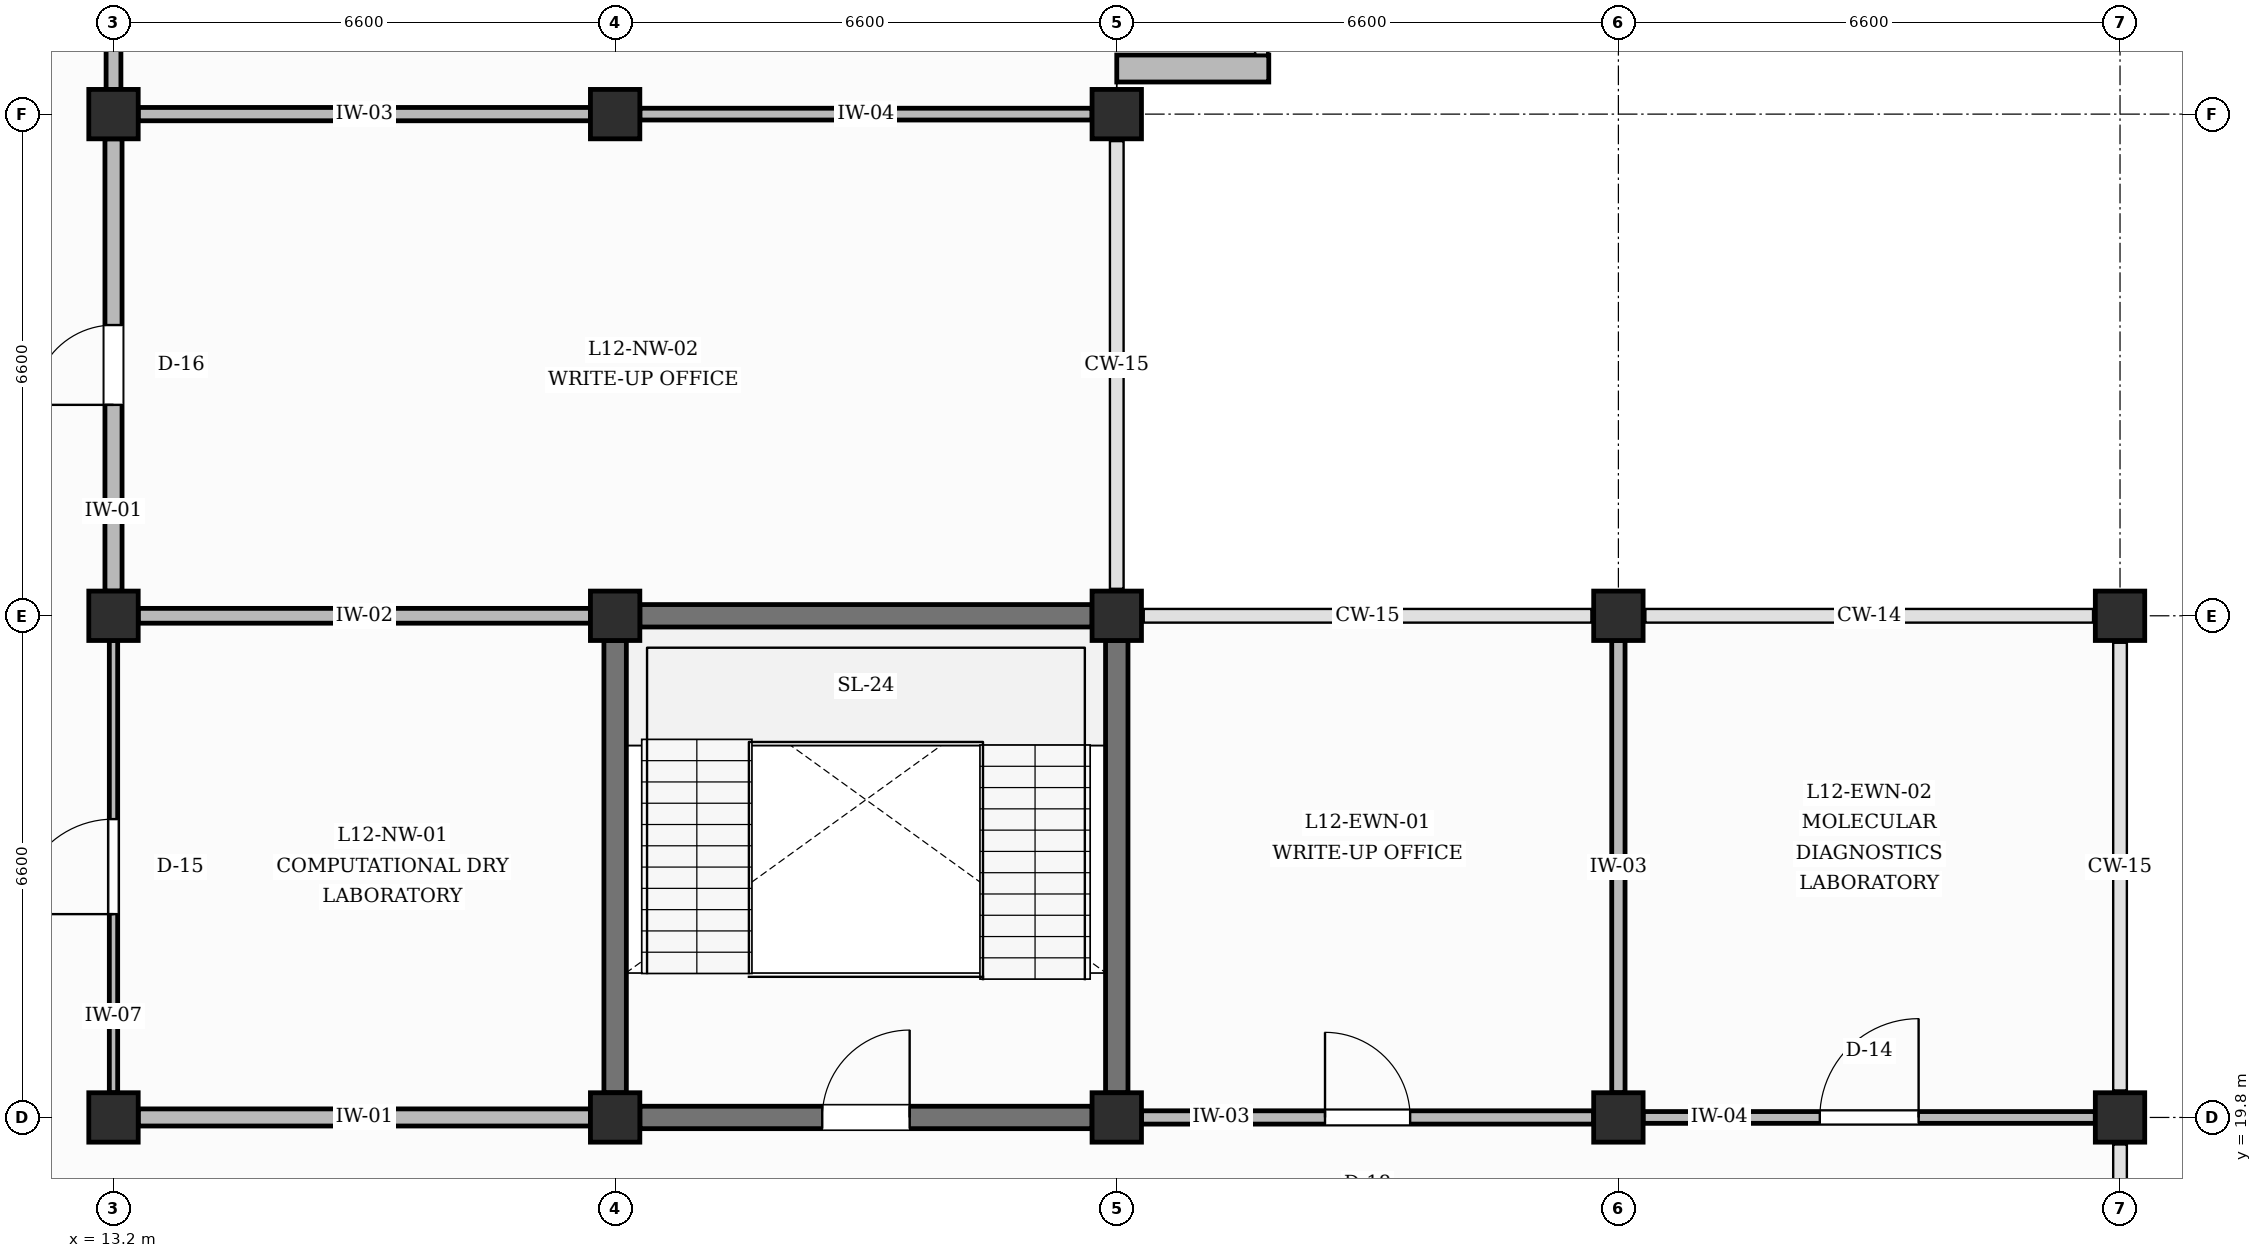
"""IFC4 building model, lengths in metres.
Left out: names, types, materials, properties, quantities, classifications, styles, units other than length and angle.
Written with IfcOpenShell. Run it as: python <this file> out.ifc"""

import sys

from ifc_helpers import new_model, si_unit, direction, frame, frame_2d, origin, origin_2d, place, context, subcontext, project, spatial, rectangle, extrude, element, fill, save


model = new_model("IFC4")
c1 = context("Model", 3, precision=1e-05, world=origin(), true_north=direction((0.0, 1.0)))
c2 = subcontext(c1, "Body", "Model", "MODEL_VIEW")
j1 = project(units=[si_unit("LENGTHUNIT", "METRE"), si_unit("PLANEANGLEUNIT", "RADIAN")], contexts=[c1])
p1 = place(None, origin())
s1 = spatial("IfcSite", under=j1, at=p1, CompositionType="ELEMENT")
p2 = place(p1, origin())
s2 = spatial("IfcBuilding", under=s1, at=p2, CompositionType="ELEMENT")
p3 = place(p2, frame((0.0, 0.0, 52.2)))
s3 = spatial("IfcBuildingStorey", under=s2, at=p3, CompositionType="ELEMENT", Elevation=52.2)
for number, where, z_axis, x_axis in (
    (1, (13.2, 19.8, 0.0), (0.0, 0.0, 1.0), (1.0, 0.0, 0.0)),
    (2, (13.2, 26.4, 0.0), (0.0, 0.0, 1.0), (1.0, 0.0, 0.0)),
    (3, (13.2, 33.0, 0.0), (0.0, 0.0, 1.0), (1.0, 0.0, 0.0)),
    (4, (19.8, 19.8, 0.0), (0.0, 0.0, 1.0), (1.0, 0.0, 0.0)),
    (5, (19.8, 26.4, 0.0), (0.0, 0.0, 1.0), (1.0, 0.0, 0.0)),
    (6, (19.8, 33.0, 0.0), (0.0, 0.0, 1.0), (1.0, 0.0, 0.0)),
    (7, (26.4, 19.8, 0.0), (0.0, 0.0, 1.0), (1.0, 0.0, 0.0)),
    (8, (26.4, 26.4, 0.0), (0.0, 0.0, 1.0), (1.0, 0.0, 0.0)),
    (9, (26.4, 33.0, 0.0), (0.0, 0.0, 1.0), (1.0, 0.0, 0.0)),
    (10, (33.0, 19.8, 0.0), (0.0, 0.0, 1.0), (1.0, 0.0, 0.0)),
    (11, (33.0, 26.4, 0.0), (0.0, 0.0, 1.0), (1.0, 0.0, 0.0)),
    (12, (39.6, 19.8, 0.0), (0.0, 0.0, 1.0), (1.0, 0.0, 0.0)),
    (13, (39.6, 26.4, 0.0), (0.0, 0.0, 1.0), (1.0, 0.0, 0.0)),
):
    element("IfcColumn", number, at=place(p3, frame(where, z_axis=z_axis, x_axis=x_axis)), inside=s3, PredefinedType="COLUMN", context=c2, shape_type="SweptSolid", body=[
        extrude(rectangle(XDim=0.65, YDim=0.65, at=origin_2d()), origin(), (0.0, 0.0, 1.0), 4.2),
    ])
p4 = place(p3, frame((26.4, 33.6, 0.0), z_axis=(0.0, 0.0, 1.0), x_axis=(1.0, 0.0, 0.0)))
e14 = element("IfcWall", 14, at=p4, inside=s3, PredefinedType="SOLIDWALL", context=c2, shape_type="SweptSolid", body=[
    extrude(rectangle(XDim=2.0, YDim=0.355, at=frame_2d((1.0, 0.0))), origin(), (0.0, 0.0, 1.0), 3.3),
])
p5 = place(p3, frame((20.125, 19.8, 0.0), z_axis=(0.0, 0.0, 1.0), x_axis=(1.0, 0.0, 0.0)))
e15 = element("IfcWall", 15, at=p5, inside=s3, PredefinedType="SHEAR", context=c2, shape_type="SweptSolid", body=[
    extrude(rectangle(XDim=5.95, YDim=0.295, at=frame_2d((2.975, 0.0))), origin(), (0.0, 0.0, 1.0), 3.3),
])
p6 = place(p5, frame((2.4, 0.0, 0.0)))
e16 = element("IfcOpeningElement", 16, at=p6, cuts=e15, PredefinedType="OPENING", context=c2, shape_type="SweptSolid", body=[
    extrude(rectangle(XDim=1.15, YDim=2.2, at=frame_2d((0.575, 1.1))), frame((0.0, 0.157, 0.0), z_axis=(0.0, -1.0, 0.0), x_axis=(1.0, 0.0, 0.0)), (0.0, 0.0, 1.0), 0.315),
])
for number, where, z_axis, x_axis in (
    (17, (20.125, 26.4, 0.0), (0.0, 0.0, 1.0), (1.0, 0.0, 0.0)),
    (18, (19.8, 20.125, 0.0), (0.0, 0.0, 1.0), (0.0, 1.0, 0.0)),
    (19, (26.4, 20.125, 0.0), (0.0, 0.0, 1.0), (0.0, 1.0, 0.0)),
):
    element("IfcWall", number, at=place(p3, frame(where, z_axis=z_axis, x_axis=x_axis)), inside=s3, PredefinedType="SHEAR", context=c2, shape_type="SweptSolid", body=[
        extrude(rectangle(XDim=5.95, YDim=0.295, at=frame_2d((2.975, 0.0))), origin(), (0.0, 0.0, 1.0), 3.3),
    ])
p7 = place(p3, frame((13.2, 20.125, 0.0), z_axis=(0.0, 0.0, 1.0), x_axis=(0.0, 1.0, 0.0)))
e20 = element("IfcWall", 20, at=p7, inside=s3, PredefinedType="PARTITIONING", context=c2, shape_type="SweptSolid", body=[
    extrude(rectangle(XDim=5.95, YDim=0.11, at=frame_2d((2.975, 0.0))), origin(), (0.0, 0.0, 1.0), 3.3),
])
p8 = place(p7, frame((2.35, 0.0, 0.0)))
e21 = element("IfcOpeningElement", 21, at=p8, cuts=e20, PredefinedType="OPENING", context=c2, shape_type="SweptSolid", body=[
    extrude(rectangle(XDim=1.25, YDim=2.25, at=frame_2d((0.625, 1.125))), frame((0.0, 0.065, 0.0), z_axis=(0.0, -1.0, 0.0), x_axis=(1.0, 0.0, 0.0)), (0.0, 0.0, 1.0), 0.13),
])
p9 = place(p3, frame((13.2, 26.725, 0.0), z_axis=(0.0, 0.0, 1.0), x_axis=(0.0, 1.0, 0.0)))
e22 = element("IfcWall", 22, at=p9, inside=s3, PredefinedType="PARTITIONING", context=c2, shape_type="SweptSolid", body=[
    extrude(rectangle(XDim=5.95, YDim=0.225, at=frame_2d((2.975, 0.0))), origin(), (0.0, 0.0, 1.0), 3.3),
])
p10 = place(p9, frame((2.45, 0.0, 0.0)))
e23 = element("IfcOpeningElement", 23, at=p10, cuts=e22, PredefinedType="OPENING", context=c2, shape_type="SweptSolid", body=[
    extrude(rectangle(XDim=1.05, YDim=2.15, at=frame_2d((0.525, 1.075))), frame((0.0, 0.123, 0.0), z_axis=(0.0, -1.0, 0.0), x_axis=(1.0, 0.0, 0.0)), (0.0, 0.0, 1.0), 0.245),
])
p11 = place(p3, frame((13.2, 33.325, 0.0), z_axis=(0.0, 0.0, 1.0), x_axis=(0.0, 1.0, 0.0)))
e24 = element("IfcWall", 24, at=p11, inside=s3, PredefinedType="PARTITIONING", context=c2, shape_type="SweptSolid", body=[
    extrude(rectangle(XDim=5.95, YDim=0.195, at=frame_2d((2.975, 0.0))), origin(), (0.0, 0.0, 1.0), 3.3),
])
p12 = place(p11, frame((2.275, 0.0, 0.0)))
e25 = element("IfcOpeningElement", 25, at=p12, cuts=e24, PredefinedType="OPENING", context=c2, shape_type="SweptSolid", body=[
    extrude(rectangle(XDim=1.4, YDim=2.25, at=frame_2d((0.7, 1.125))), frame((0.0, 0.107, 0.0), z_axis=(0.0, -1.0, 0.0), x_axis=(1.0, 0.0, 0.0)), (0.0, 0.0, 1.0), 0.215),
])
p13 = place(p3, frame((13.525, 19.8, 0.0), z_axis=(0.0, 0.0, 1.0), x_axis=(1.0, 0.0, 0.0)))
e26 = element("IfcWall", 26, at=p13, inside=s3, PredefinedType="PARTITIONING", context=c2, shape_type="SweptSolid", body=[
    extrude(rectangle(XDim=5.95, YDim=0.225, at=frame_2d((2.975, 0.0))), origin(), (0.0, 0.0, 1.0), 3.3),
])
p14 = place(p3, frame((13.525, 26.4, 0.0), z_axis=(0.0, 0.0, 1.0), x_axis=(1.0, 0.0, 0.0)))
e27 = element("IfcWall", 27, at=p14, inside=s3, PredefinedType="PARTITIONING", context=c2, shape_type="SweptSolid", body=[
    extrude(rectangle(XDim=5.95, YDim=0.195, at=frame_2d((2.975, 0.0))), origin(), (0.0, 0.0, 1.0), 3.3),
])
p15 = place(p3, frame((13.525, 33.0, 0.0), z_axis=(0.0, 0.0, 1.0), x_axis=(1.0, 0.0, 0.0)))
e28 = element("IfcWall", 28, at=p15, inside=s3, PredefinedType="PARTITIONING", context=c2, shape_type="SweptSolid", body=[
    extrude(rectangle(XDim=5.95, YDim=0.175, at=frame_2d((2.975, 0.0))), origin(), (0.0, 0.0, 1.0), 3.3),
])
p16 = place(p3, frame((20.125, 33.0, 0.0), z_axis=(0.0, 0.0, 1.0), x_axis=(1.0, 0.0, 0.0)))
e29 = element("IfcWall", 29, at=p16, inside=s3, PredefinedType="PARTITIONING", context=c2, shape_type="SweptSolid", body=[
    extrude(rectangle(XDim=5.95, YDim=0.155, at=frame_2d((2.975, 0.0))), origin(), (0.0, 0.0, 1.0), 3.45),
])
p17 = place(p3, frame((26.725, 19.8, 0.0), z_axis=(0.0, 0.0, 1.0), x_axis=(1.0, 0.0, 0.0)))
e30 = element("IfcWall", 30, at=p17, inside=s3, PredefinedType="PARTITIONING", context=c2, shape_type="SweptSolid", body=[
    extrude(rectangle(XDim=5.95, YDim=0.175, at=frame_2d((2.975, 0.0))), origin(), (0.0, 0.0, 1.0), 3.3),
])
p18 = place(p17, frame((2.415, 0.0, 0.0)))
e31 = element("IfcOpeningElement", 31, at=p18, cuts=e30, PredefinedType="OPENING", context=c2, shape_type="SweptSolid", body=[
    extrude(rectangle(XDim=1.12, YDim=2.2, at=frame_2d((0.56, 1.1))), frame((0.0, 0.097, 0.0), z_axis=(0.0, -1.0, 0.0), x_axis=(1.0, 0.0, 0.0)), (0.0, 0.0, 1.0), 0.195),
])
p19 = place(p3, frame((33.0, 20.125, 0.0), z_axis=(0.0, 0.0, 1.0), x_axis=(0.0, 1.0, 0.0)))
e32 = element("IfcWall", 32, at=p19, inside=s3, PredefinedType="PARTITIONING", context=c2, shape_type="SweptSolid", body=[
    extrude(rectangle(XDim=5.95, YDim=0.175, at=frame_2d((2.975, 0.0))), origin(), (0.0, 0.0, 1.0), 3.3),
])
p20 = place(p3, frame((33.325, 19.8, 0.0), z_axis=(0.0, 0.0, 1.0), x_axis=(1.0, 0.0, 0.0)))
e33 = element("IfcWall", 33, at=p20, inside=s3, PredefinedType="PARTITIONING", context=c2, shape_type="SweptSolid", body=[
    extrude(rectangle(XDim=5.95, YDim=0.155, at=frame_2d((2.975, 0.0))), origin(), (0.0, 0.0, 1.0), 3.3),
])
p21 = place(p20, frame((2.325, 0.0, 0.0)))
e34 = element("IfcOpeningElement", 34, at=p21, cuts=e33, PredefinedType="OPENING", context=c2, shape_type="SweptSolid", body=[
    extrude(rectangle(XDim=1.3, YDim=2.3, at=frame_2d((0.65, 1.15))), frame((0.0, 0.087, 0.0), z_axis=(0.0, -1.0, 0.0), x_axis=(1.0, 0.0, 0.0)), (0.0, 0.0, 1.0), 0.175),
])
p22 = place(p6, origin())
e35 = element("IfcDoor", 35, at=p22, inside=s3, OperationType="SINGLE_SWING_RIGHT", PredefinedType="DOOR", context=c2, shape_type="SweptSolid", body=[
    extrude(rectangle(XDim=1.15, YDim=2.2, at=frame_2d((0.575, 1.1))), frame((0.0, 0.025, 0.0), z_axis=(0.0, -1.0, 0.0), x_axis=(1.0, 0.0, 0.0)), (0.0, 0.0, 1.0), 0.05),
])
fill(e16, e35)
p23 = place(p8, origin())
e36 = element("IfcDoor", 36, at=p23, inside=s3, OperationType="SINGLE_SWING_LEFT", PredefinedType="DOOR", context=c2, shape_type="SweptSolid", body=[
    extrude(rectangle(XDim=1.25, YDim=2.25, at=frame_2d((0.625, 1.125))), frame((0.0, 0.025, 0.0), z_axis=(0.0, -1.0, 0.0), x_axis=(1.0, 0.0, 0.0)), (0.0, 0.0, 1.0), 0.05),
])
fill(e21, e36)
p24 = place(p10, origin())
e37 = element("IfcDoor", 37, at=p24, inside=s3, OperationType="SINGLE_SWING_LEFT", PredefinedType="DOOR", context=c2, shape_type="SweptSolid", body=[
    extrude(rectangle(XDim=1.05, YDim=2.15, at=frame_2d((0.525, 1.075))), frame((0.0, 0.025, 0.0), z_axis=(0.0, -1.0, 0.0), x_axis=(1.0, 0.0, 0.0)), (0.0, 0.0, 1.0), 0.05),
])
fill(e23, e37)
p25 = place(p18, origin())
e38 = element("IfcDoor", 38, at=p25, inside=s3, OperationType="SINGLE_SWING_LEFT", PredefinedType="DOOR", context=c2, shape_type="SweptSolid", body=[
    extrude(rectangle(XDim=1.12, YDim=2.2, at=frame_2d((0.56, 1.1))), frame((0.0, 0.025, 0.0), z_axis=(0.0, -1.0, 0.0), x_axis=(1.0, 0.0, 0.0)), (0.0, 0.0, 1.0), 0.05),
])
fill(e31, e38)
p26 = place(p21, origin())
e39 = element("IfcDoor", 39, at=p26, inside=s3, OperationType="SINGLE_SWING_RIGHT", PredefinedType="DOOR", context=c2, shape_type="SweptSolid", body=[
    extrude(rectangle(XDim=1.3, YDim=2.3, at=frame_2d((0.65, 1.15))), frame((0.0, 0.025, 0.0), z_axis=(0.0, -1.0, 0.0), x_axis=(1.0, 0.0, 0.0)), (0.0, 0.0, 1.0), 0.05),
])
fill(e34, e39)
save(model, sys.argv[1])
